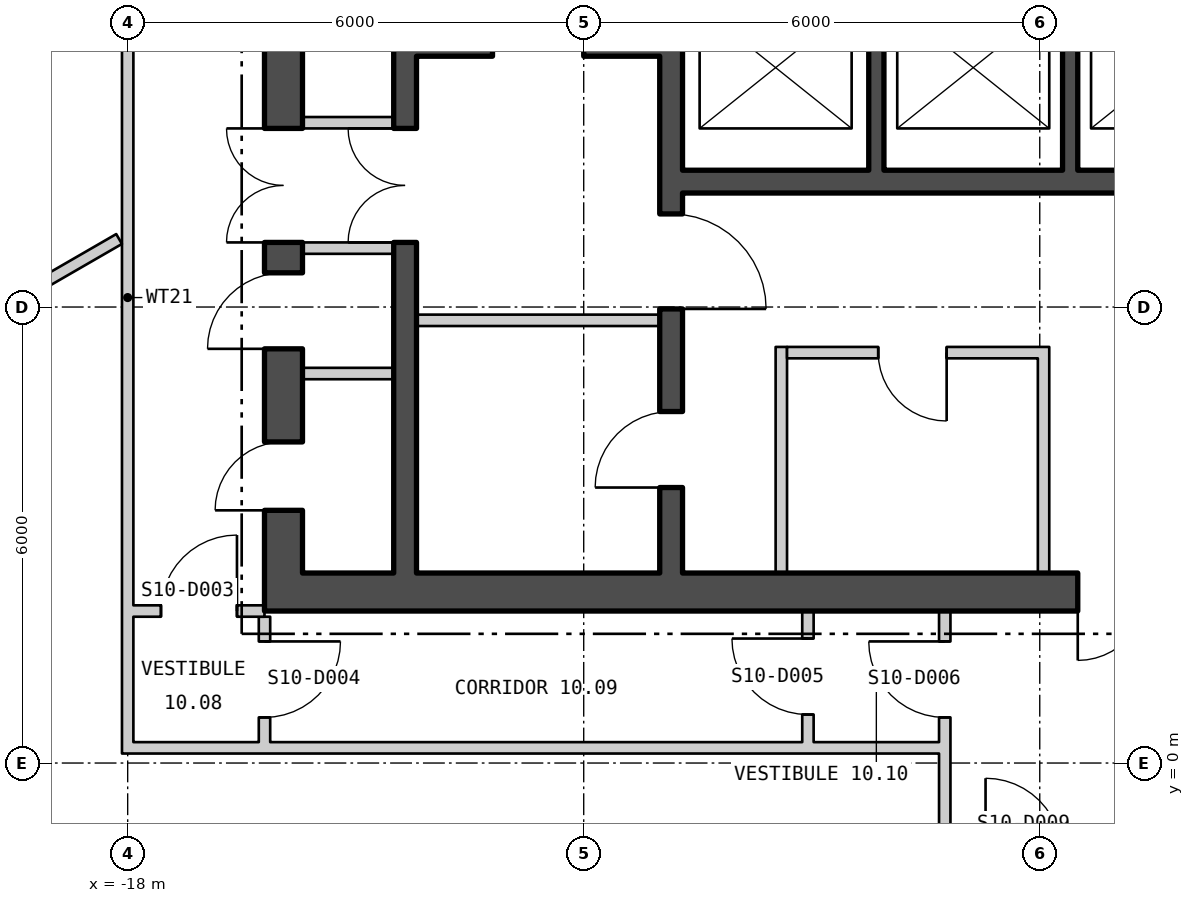
"""IFC4 building model, lengths in metres.
Left out: names, types, materials, properties, quantities, classifications, styles, units other than length and angle.
Written with IfcOpenShell. Run it as: python <this file> out.ifc"""

import sys

from ifc_helpers import new_model, si_unit, direction, frame, frame_2d, origin, place, context, subcontext, project, spatial, polyline, rectangle, outline, extrude, element, fill, save


model = new_model("IFC4")
c1 = context("Model", 3, precision=1e-05, world=origin(), true_north=direction((0.0, 1.0)))
c2 = subcontext(c1, "Body", "Model", "MODEL_VIEW")
j1 = project(units=[si_unit("LENGTHUNIT", "METRE"), si_unit("PLANEANGLEUNIT", "RADIAN")], contexts=[c1])
p1 = place(None, origin())
s1 = spatial("IfcSite", under=j1, at=p1, CompositionType="ELEMENT")
p2 = place(p1, origin())
s2 = spatial("IfcBuilding", under=s1, at=p2, CompositionType="ELEMENT")
p3 = place(p2, frame((0.0, 0.0, 139.8)))
s3 = spatial("IfcBuildingStorey", under=s2, at=p3, CompositionType="ELEMENT", Elevation=139.8)
p4 = place(p3, frame((-27.235, 12.423, -0.18), z_axis=(0.0, 0.0, 1.0), x_axis=(0.500000335318, -0.866025210188, 0.0)))
e1 = element("IfcWall", 1, at=p4, inside=s3, PredefinedType="SOLIDWALL", context=c2, shape_type="SweptSolid", body=[
    extrude(outline(polyline([(-0.13, -0.225), (45.88, -0.225), (45.62, 0.225), (0.13, 0.225), (-0.13, -0.225)])), origin(), (0.0, 0.0, 1.0), 3.68),
])
p5 = place(p4, frame((1.425, 0.0, 1.08)))
e2 = element("IfcOpeningElement", 2, at=p5, cuts=e1, PredefinedType="OPENING", context=c2, shape_type="SweptSolid", body=[
    extrude(rectangle(XDim=2.4, YDim=2.0, at=frame_2d((1.2, 1.0))), frame((0.0, 0.235, 0.0), z_axis=(0.0, -1.0, 0.0), x_axis=(1.0, 0.0, 0.0)), (0.0, 0.0, 1.0), 0.47),
])
p6 = place(p4, frame((5.895, 0.0, 1.08)))
e3 = element("IfcOpeningElement", 3, at=p6, cuts=e1, PredefinedType="OPENING", context=c2, shape_type="SweptSolid", body=[
    extrude(rectangle(XDim=2.4, YDim=2.0, at=frame_2d((1.2, 1.0))), frame((0.0, 0.235, 0.0), z_axis=(0.0, -1.0, 0.0), x_axis=(1.0, 0.0, 0.0)), (0.0, 0.0, 1.0), 0.47),
])
p7 = place(p4, frame((10.403, 0.0, 1.08)))
e4 = element("IfcOpeningElement", 4, at=p7, cuts=e1, PredefinedType="OPENING", context=c2, shape_type="SweptSolid", body=[
    extrude(rectangle(XDim=2.4, YDim=2.0, at=frame_2d((1.2, 1.0))), frame((0.0, 0.235, 0.0), z_axis=(0.0, -1.0, 0.0), x_axis=(1.0, 0.0, 0.0)), (0.0, 0.0, 1.0), 0.47),
])
p8 = place(p4, frame((14.912, 0.0, 1.08)))
e5 = element("IfcOpeningElement", 5, at=p8, cuts=e1, PredefinedType="OPENING", context=c2, shape_type="SweptSolid", body=[
    extrude(rectangle(XDim=2.4, YDim=2.0, at=frame_2d((1.2, 1.0))), frame((0.0, 0.235, 0.0), z_axis=(0.0, -1.0, 0.0), x_axis=(1.0, 0.0, 0.0)), (0.0, 0.0, 1.0), 0.47),
])
p9 = place(p4, frame((19.421, 0.0, 1.08)))
e6 = element("IfcOpeningElement", 6, at=p9, cuts=e1, PredefinedType="OPENING", context=c2, shape_type="SweptSolid", body=[
    extrude(rectangle(XDim=2.4, YDim=2.0, at=frame_2d((1.2, 1.0))), frame((0.0, 0.235, 0.0), z_axis=(0.0, -1.0, 0.0), x_axis=(1.0, 0.0, 0.0)), (0.0, 0.0, 1.0), 0.47),
])
p10 = place(p4, frame((23.929, 0.0, 1.08)))
e7 = element("IfcOpeningElement", 7, at=p10, cuts=e1, PredefinedType="OPENING", context=c2, shape_type="SweptSolid", body=[
    extrude(rectangle(XDim=2.4, YDim=2.0, at=frame_2d((1.2, 1.0))), frame((0.0, 0.235, 0.0), z_axis=(0.0, -1.0, 0.0), x_axis=(1.0, 0.0, 0.0)), (0.0, 0.0, 1.0), 0.47),
])
p11 = place(p4, frame((28.438, 0.0, 1.08)))
e8 = element("IfcOpeningElement", 8, at=p11, cuts=e1, PredefinedType="OPENING", context=c2, shape_type="SweptSolid", body=[
    extrude(rectangle(XDim=2.4, YDim=2.0, at=frame_2d((1.2, 1.0))), frame((0.0, 0.235, 0.0), z_axis=(0.0, -1.0, 0.0), x_axis=(1.0, 0.0, 0.0)), (0.0, 0.0, 1.0), 0.47),
])
p12 = place(p4, frame((32.947, 0.0, 1.08)))
e9 = element("IfcOpeningElement", 9, at=p12, cuts=e1, PredefinedType="OPENING", context=c2, shape_type="SweptSolid", body=[
    extrude(rectangle(XDim=2.4, YDim=2.0, at=frame_2d((1.2, 1.0))), frame((0.0, 0.235, 0.0), z_axis=(0.0, -1.0, 0.0), x_axis=(1.0, 0.0, 0.0)), (0.0, 0.0, 1.0), 0.47),
])
p13 = place(p4, frame((37.455, 0.0, 1.08)))
e10 = element("IfcOpeningElement", 10, at=p13, cuts=e1, PredefinedType="OPENING", context=c2, shape_type="SweptSolid", body=[
    extrude(rectangle(XDim=2.4, YDim=2.0, at=frame_2d((1.2, 1.0))), frame((0.0, 0.235, 0.0), z_axis=(0.0, -1.0, 0.0), x_axis=(1.0, 0.0, 0.0)), (0.0, 0.0, 1.0), 0.47),
])
p14 = place(p4, frame((41.925, 0.0, 1.08)))
e11 = element("IfcOpeningElement", 11, at=p14, cuts=e1, PredefinedType="OPENING", context=c2, shape_type="SweptSolid", body=[
    extrude(rectangle(XDim=2.4, YDim=2.0, at=frame_2d((1.2, 1.0))), frame((0.0, 0.235, 0.0), z_axis=(0.0, -1.0, 0.0), x_axis=(1.0, 0.0, 0.0)), (0.0, 0.0, 1.0), 0.47),
])
p15 = place(p3, frame((-16.2, 2.25, 0.0), z_axis=(0.0, 0.0, 1.0), x_axis=(1.0, 0.0, 0.0)))
e12 = element("IfcWall", 12, at=p15, inside=s3, PredefinedType="SHEAR", context=c2, shape_type="SweptSolid", body=[
    extrude(rectangle(XDim=32.4, YDim=0.5, at=frame_2d((16.2, 0.0))), origin(), (0.0, 0.0, 1.0), 3.7),
])
p16 = place(p15, frame((10.7, 0.0, 0.0)))
e13 = element("IfcOpeningElement", 13, at=p16, cuts=e12, PredefinedType="OPENING", context=c2, shape_type="SweptSolid", body=[
    extrude(rectangle(XDim=1.8, YDim=2.4, at=frame_2d((0.9, 1.2))), frame((0.0, 0.26, 0.0), z_axis=(0.0, -1.0, 0.0), x_axis=(1.0, 0.0, 0.0)), (0.0, 0.0, 1.0), 0.52),
])
p17 = place(p15, frame((20.7, 0.0, 0.0)))
e14 = element("IfcOpeningElement", 14, at=p17, cuts=e12, PredefinedType="OPENING", context=c2, shape_type="SweptSolid", body=[
    extrude(rectangle(XDim=1.8, YDim=2.4, at=frame_2d((0.9, 1.2))), frame((0.0, 0.26, 0.0), z_axis=(0.0, -1.0, 0.0), x_axis=(1.0, 0.0, 0.0)), (0.0, 0.0, 1.0), 0.52),
])
p18 = place(p3, frame((-15.95, 2.5, 0.0), z_axis=(0.0, 0.0, 1.0), x_axis=(0.0, 1.0, 0.0)))
e15 = element("IfcWall", 15, at=p18, inside=s3, PredefinedType="SHEAR", context=c2, shape_type="SweptSolid", body=[
    extrude(rectangle(XDim=15.0, YDim=0.5, at=frame_2d((7.5, 0.0))), origin(), (0.0, 0.0, 1.0), 3.7),
])
p19 = place(p18, frame((4.35, 0.0, 0.0)))
e16 = element("IfcOpeningElement", 16, at=p19, cuts=e15, PredefinedType="OPENING", context=c2, shape_type="SweptSolid", body=[
    extrude(rectangle(XDim=1.5, YDim=2.1, at=frame_2d((0.75, 1.05))), frame((0.0, 0.26, 0.0), z_axis=(0.0, -1.0, 0.0), x_axis=(1.0, 0.0, 0.0)), (0.0, 0.0, 1.0), 0.52),
])
p20 = place(p18, frame((0.825, 0.0, 0.0)))
e17 = element("IfcOpeningElement", 17, at=p20, cuts=e15, PredefinedType="OPENING", context=c2, shape_type="SweptSolid", body=[
    extrude(rectangle(XDim=0.9, YDim=2.1, at=frame_2d((0.45, 1.05))), frame((0.0, 0.26, 0.0), z_axis=(0.0, -1.0, 0.0), x_axis=(1.0, 0.0, 0.0)), (0.0, 0.0, 1.0), 0.52),
])
p21 = place(p18, frame((2.95, 0.0, 0.0)))
e18 = element("IfcOpeningElement", 18, at=p21, cuts=e15, PredefinedType="OPENING", context=c2, shape_type="SweptSolid", body=[
    extrude(rectangle(XDim=1.0, YDim=2.1, at=frame_2d((0.5, 1.05))), frame((0.0, 0.26, 0.0), z_axis=(0.0, -1.0, 0.0), x_axis=(1.0, 0.0, 0.0)), (0.0, 0.0, 1.0), 0.52),
])
p22 = place(p18, frame((8.882, 0.0, 0.0)))
e19 = element("IfcOpeningElement", 19, at=p22, cuts=e15, PredefinedType="OPENING", context=c2, shape_type="SweptSolid", body=[
    extrude(rectangle(XDim=0.9, YDim=2.1, at=frame_2d((0.45, 1.05))), frame((0.0, 0.26, 0.0), z_axis=(0.0, -1.0, 0.0), x_axis=(1.0, 0.0, 0.0)), (0.0, 0.0, 1.0), 0.52),
])
p23 = place(p18, frame((13.457, 0.0, 0.0)))
e20 = element("IfcOpeningElement", 20, at=p23, cuts=e15, PredefinedType="OPENING", context=c2, shape_type="SweptSolid", body=[
    extrude(rectangle(XDim=0.9, YDim=2.1, at=frame_2d((0.45, 1.05))), frame((0.0, 0.26, 0.0), z_axis=(0.0, -1.0, 0.0), x_axis=(1.0, 0.0, 0.0)), (0.0, 0.0, 1.0), 0.52),
])
p24 = place(p3, frame((-10.85, 2.5, 0.0), z_axis=(0.0, 0.0, 1.0), x_axis=(0.0, 1.0, 0.0)))
e21 = element("IfcWall", 21, at=p24, inside=s3, PredefinedType="SHEAR", context=c2, shape_type="SweptSolid", body=[
    extrude(rectangle(XDim=15.0, YDim=0.3, at=frame_2d((7.5, 0.0))), origin(), (0.0, 0.0, 1.0), 3.7),
])
p25 = place(p24, frame((3.475, 0.0, 0.0)))
e22 = element("IfcOpeningElement", 22, at=p25, cuts=e21, PredefinedType="OPENING", context=c2, shape_type="SweptSolid", body=[
    extrude(rectangle(XDim=1.25, YDim=2.1, at=frame_2d((0.625, 1.05))), frame((0.0, 0.16, 0.0), z_axis=(0.0, -1.0, 0.0), x_axis=(1.0, 0.0, 0.0)), (0.0, 0.0, 1.0), 0.32),
])
p26 = place(p24, frame((1.125, 0.0, 0.0)))
e23 = element("IfcOpeningElement", 23, at=p26, cuts=e21, PredefinedType="OPENING", context=c2, shape_type="SweptSolid", body=[
    extrude(rectangle(XDim=1.0, YDim=2.1, at=frame_2d((0.5, 1.05))), frame((0.0, 0.16, 0.0), z_axis=(0.0, -1.0, 0.0), x_axis=(1.0, 0.0, 0.0)), (0.0, 0.0, 1.0), 0.32),
])
p27 = place(p3, frame((-14.35, 2.5, 0.0), z_axis=(0.0, 0.0, 1.0), x_axis=(0.0, 1.0, 0.0)))
e24 = element("IfcWall", 24, at=p27, inside=s3, PredefinedType="SHEAR", context=c2, shape_type="SweptSolid", body=[
    extrude(rectangle(XDim=15.0, YDim=0.3, at=frame_2d((7.5, 0.0))), origin(), (0.0, 0.0, 1.0), 3.7),
])
p28 = place(p27, frame((4.35, 0.0, 0.0)))
e25 = element("IfcOpeningElement", 25, at=p28, cuts=e24, PredefinedType="OPENING", context=c2, shape_type="SweptSolid", body=[
    extrude(rectangle(XDim=1.5, YDim=2.1, at=frame_2d((0.75, 1.05))), frame((0.0, 0.16, 0.0), z_axis=(0.0, -1.0, 0.0), x_axis=(1.0, 0.0, 0.0)), (0.0, 0.0, 1.0), 0.32),
])
p29 = place(p3, frame((-14.2, 9.45, 0.0), z_axis=(0.0, 0.0, 1.0), x_axis=(1.0, 0.0, 0.0)))
e26 = element("IfcWall", 26, at=p29, inside=s3, PredefinedType="SHEAR", context=c2, shape_type="SweptSolid", body=[
    extrude(rectangle(XDim=3.2, YDim=0.3, at=frame_2d((1.6, 0.0))), origin(), (0.0, 0.0, 1.0), 3.7),
])
p30 = place(p29, frame((1.0, 0.0, 0.0)))
e27 = element("IfcOpeningElement", 27, at=p30, cuts=e26, PredefinedType="OPENING", context=c2, shape_type="SweptSolid", body=[
    extrude(rectangle(XDim=1.2, YDim=2.1, at=frame_2d((0.6, 1.05))), frame((0.0, 0.16, 0.0), z_axis=(0.0, -1.0, 0.0), x_axis=(1.0, 0.0, 0.0)), (0.0, 0.0, 1.0), 0.32),
])
p31 = place(p3, frame((-10.7, 7.65, 0.0), z_axis=(0.0, 0.0, 1.0), x_axis=(1.0, 0.0, 0.0)))
e28 = element("IfcWall", 28, at=p31, inside=s3, PredefinedType="SHEAR", context=c2, shape_type="SweptSolid", body=[
    extrude(rectangle(XDim=10.3, YDim=0.3, at=frame_2d((5.15, 0.0))), origin(), (0.0, 0.0, 1.0), 3.7),
])
for number, where, z_axis, x_axis in (
    (29, (-8.15, 7.8, 0.0), (0.0, 0.0, 1.0), (0.0, 1.0, 0.0)),
    (30, (-5.6, 7.8, 0.0), (0.0, 0.0, 1.0), (0.0, 1.0, 0.0)),
):
    element("IfcWall", number, at=place(p3, frame(where, z_axis=z_axis, x_axis=x_axis)), inside=s3, PredefinedType="SHEAR", context=c2, shape_type="SweptSolid", body=[
        extrude(rectangle(XDim=2.7, YDim=0.2, at=frame_2d((1.35, 0.0))), origin(), (0.0, 0.0, 1.0), 3.7),
    ])
p32 = place(p3, frame((-14.2, 5.825, 0.0), z_axis=(0.0, 0.0, 1.0), x_axis=(1.0, 0.0, 0.0)))
e31 = element("IfcWall", 31, at=p32, inside=s3, PredefinedType="PARTITIONING", context=c2, shape_type="SweptSolid", body=[
    extrude(rectangle(XDim=3.2, YDim=0.15, at=frame_2d((1.6, 0.0))), origin(), (0.0, 0.0, 1.0), 3.7),
])
for number, where, z_axis, x_axis in (
    (32, (-15.7, 6.775, 0.0), (0.0, 0.0, 1.0), (1.0, 0.0, 0.0)),
    (33, (-15.7, 8.425, 0.0), (0.0, 0.0, 1.0), (1.0, 0.0, 0.0)),
    (34, (-15.7, 5.125, 0.0), (0.0, 0.0, 1.0), (1.0, 0.0, 0.0)),
):
    element("IfcWall", number, at=place(p3, frame(where, z_axis=z_axis, x_axis=x_axis)), inside=s3, PredefinedType="PARTITIONING", context=c2, shape_type="SweptSolid", body=[
        extrude(rectangle(XDim=1.2, YDim=0.15, at=frame_2d((0.6, 0.0))), origin(), (0.0, 0.0, 1.0), 3.7),
    ])
for number, where, z_axis, x_axis in (
    (35, (-9.4, 2.5, 0.0), (0.0, 0.0, 1.0), (0.0, 1.0, 0.0)),
    (36, (-5.95, 2.5, 0.0), (0.0, 0.0, 1.0), (0.0, 1.0, 0.0)),
):
    element("IfcWall", number, at=place(p3, frame(where, z_axis=z_axis, x_axis=x_axis)), inside=s3, PredefinedType="PARTITIONING", context=c2, shape_type="SweptSolid", body=[
        extrude(rectangle(XDim=2.975, YDim=0.15, at=frame_2d((1.488, 0.0))), origin(), (0.0, 0.0, 1.0), 3.7),
    ])
p33 = place(p3, frame((-9.325, 5.4, 0.0), z_axis=(0.0, 0.0, 1.0), x_axis=(1.0, 0.0, 0.0)))
e37 = element("IfcWall", 37, at=p33, inside=s3, PredefinedType="PARTITIONING", context=c2, shape_type="SweptSolid", body=[
    extrude(rectangle(XDim=3.3, YDim=0.15, at=frame_2d((1.65, 0.0))), origin(), (0.0, 0.0, 1.0), 3.7),
])
p34 = place(p33, frame((1.2, 0.0, 0.0)))
e38 = element("IfcOpeningElement", 38, at=p34, cuts=e37, PredefinedType="OPENING", context=c2, shape_type="SweptSolid", body=[
    extrude(rectangle(XDim=0.9, YDim=2.1, at=frame_2d((0.45, 1.05))), frame((0.0, 0.085, 0.0), z_axis=(0.0, -1.0, 0.0), x_axis=(1.0, 0.0, 0.0)), (0.0, 0.0, 1.0), 0.17),
])
p35 = place(p3, frame((-21.976, 4.664, 0.0), z_axis=(0.0, 0.0, 1.0), x_axis=(0.865957845807, 0.500116995598, 0.0)))
e39 = element("IfcWall", 39, at=p35, inside=s3, PredefinedType="PARTITIONING", context=c2, shape_type="SweptSolid", body=[
    extrude(rectangle(XDim=4.461, YDim=0.15, at=frame_2d((2.231, 0.0))), origin(), (0.0, 0.0, 1.0), 3.7),
])
p36 = place(p3, frame((-18.0, 0.125, 0.0), z_axis=(0.0, 0.0, 1.0), x_axis=(0.0, 1.0, 0.0)))
e40 = element("IfcWall", 40, at=p36, inside=s3, PredefinedType="PARTITIONING", context=c2, shape_type="SweptSolid", body=[
    extrude(rectangle(XDim=11.999, YDim=0.15, at=frame_2d((6.0, 0.0))), origin(), (0.0, 0.0, 1.0), 3.7),
])
p37 = place(p3, frame((-17.925, 0.2, 0.0), z_axis=(0.0, 0.0, 1.0), x_axis=(1.0, 0.0, 0.0)))
e41 = element("IfcWall", 41, at=p37, inside=s3, PredefinedType="PARTITIONING", context=c2, shape_type="SweptSolid", body=[
    extrude(rectangle(XDim=10.6, YDim=0.15, at=frame_2d((5.3, 0.0))), origin(), (0.0, 0.0, 1.0), 3.7),
])
p38 = place(p3, frame((-17.925, 2.0, 0.0), z_axis=(0.0, 0.0, 1.0), x_axis=(1.0, 0.0, 0.0)))
e42 = element("IfcWall", 42, at=p38, inside=s3, PredefinedType="PARTITIONING", context=c2, shape_type="SweptSolid", body=[
    extrude(rectangle(XDim=1.725, YDim=0.15, at=frame_2d((0.863, 0.0))), origin(), (0.0, 0.0, 1.0), 3.11),
])
p39 = place(p38, frame((0.363, 0.0, 0.0)))
e43 = element("IfcOpeningElement", 43, at=p39, cuts=e42, PredefinedType="OPENING", context=c2, shape_type="SweptSolid", body=[
    extrude(rectangle(XDim=1.0, YDim=2.1, at=frame_2d((0.5, 1.05))), frame((0.0, 0.085, 0.0), z_axis=(0.0, -1.0, 0.0), x_axis=(1.0, 0.0, 0.0)), (0.0, 0.0, 1.0), 0.17),
])
p40 = place(p3, frame((-16.2, 0.275, 0.0), z_axis=(0.0, 0.0, 1.0), x_axis=(0.0, 1.0, 0.0)))
e44 = element("IfcWall", 44, at=p40, inside=s3, PredefinedType="PARTITIONING", context=c2, shape_type="SweptSolid", body=[
    extrude(rectangle(XDim=1.65, YDim=0.15, at=frame_2d((0.825, 0.0))), origin(), (0.0, 0.0, 1.0), 3.7),
])
p41 = place(p40, frame((0.325, 0.0, 0.0)))
e45 = element("IfcOpeningElement", 45, at=p41, cuts=e44, PredefinedType="OPENING", context=c2, shape_type="SweptSolid", body=[
    extrude(rectangle(XDim=1.0, YDim=2.1, at=frame_2d((0.5, 1.05))), frame((0.0, 0.085, 0.0), z_axis=(0.0, -1.0, 0.0), x_axis=(1.0, 0.0, 0.0)), (0.0, 0.0, 1.0), 0.17),
])
p42 = place(p3, frame((-9.05, 0.275, 0.0), z_axis=(0.0, 0.0, 1.0), x_axis=(0.0, 1.0, 0.0)))
e46 = element("IfcWall", 46, at=p42, inside=s3, PredefinedType="PARTITIONING", context=c2, shape_type="SweptSolid", body=[
    extrude(rectangle(XDim=1.725, YDim=0.15, at=frame_2d((0.863, 0.0))), origin(), (0.0, 0.0, 1.0), 3.7),
])
p43 = place(p42, frame((0.363, 0.0, 0.0)))
e47 = element("IfcOpeningElement", 47, at=p43, cuts=e46, PredefinedType="OPENING", context=c2, shape_type="SweptSolid", body=[
    extrude(rectangle(XDim=1.0, YDim=2.1, at=frame_2d((0.5, 1.05))), frame((0.0, 0.085, 0.0), z_axis=(0.0, -1.0, 0.0), x_axis=(1.0, 0.0, 0.0)), (0.0, 0.0, 1.0), 0.17),
])
p44 = place(p3, frame((-7.25, -3.46, 0.0), z_axis=(0.0, 0.0, 1.0), x_axis=(0.0, 1.0, 0.0)))
e48 = element("IfcWall", 48, at=p44, inside=s3, PredefinedType="PARTITIONING", context=c2, shape_type="SweptSolid", body=[
    extrude(rectangle(XDim=5.46, YDim=0.15, at=frame_2d((2.73, 0.0))), origin(), (0.0, 0.0, 1.0), 3.7),
])
p45 = place(p44, frame((4.06, 0.0, 0.0)))
e49 = element("IfcOpeningElement", 49, at=p45, cuts=e48, PredefinedType="OPENING", context=c2, shape_type="SweptSolid", body=[
    extrude(rectangle(XDim=1.0, YDim=2.1, at=frame_2d((0.5, 1.05))), frame((0.0, 0.085, 0.0), z_axis=(0.0, -1.0, 0.0), x_axis=(1.0, 0.0, 0.0)), (0.0, 0.0, 1.0), 0.17),
])
p46 = place(p8, origin())
e50 = element("IfcWindow", 50, at=p46, inside=s3, PartitioningType="SINGLE_PANEL", PredefinedType="WINDOW", context=c2, shape_type="SweptSolid", body=[
    extrude(rectangle(XDim=2.4, YDim=2.0, at=frame_2d((1.2, 1.0))), frame((0.0, 0.105, 0.0), z_axis=(0.0, -1.0, 0.0), x_axis=(1.0, 0.0, 0.0)), (0.0, 0.0, 1.0), 0.06),
])
fill(e5, e50)
p47 = place(p25, origin())
e51 = element("IfcDoor", 51, at=p47, inside=s3, OperationType="SINGLE_SWING_LEFT", PredefinedType="DOOR", context=c2, shape_type="SweptSolid", body=[
    extrude(rectangle(XDim=1.25, YDim=2.1, at=frame_2d((0.625, 1.05))), frame((0.0, 0.025, 0.0), z_axis=(0.0, -1.0, 0.0), x_axis=(1.0, 0.0, 0.0)), (0.0, 0.0, 1.0), 0.05),
])
fill(e22, e51)
p48 = place(p26, origin())
e52 = element("IfcDoor", 52, at=p48, inside=s3, OperationType="SINGLE_SWING_RIGHT", PredefinedType="DOOR", context=c2, shape_type="SweptSolid", body=[
    extrude(rectangle(XDim=1.0, YDim=2.1, at=frame_2d((0.5, 1.05))), frame((0.0, 0.025, 0.0), z_axis=(0.0, -1.0, 0.0), x_axis=(1.0, 0.0, 0.0)), (0.0, 0.0, 1.0), 0.05),
])
fill(e23, e52)
p49 = place(p28, origin())
e53 = element("IfcDoor", 53, at=p49, inside=s3, OperationType="DOUBLE_DOOR_SINGLE_SWING", PredefinedType="DOOR", context=c2, shape_type="SweptSolid", body=[
    extrude(rectangle(XDim=1.5, YDim=2.1, at=frame_2d((0.75, 1.05))), frame((0.0, 0.025, 0.0), z_axis=(0.0, -1.0, 0.0), x_axis=(1.0, 0.0, 0.0)), (0.0, 0.0, 1.0), 0.05),
])
fill(e25, e53)
p50 = place(p19, origin())
e54 = element("IfcDoor", 54, at=p50, inside=s3, OperationType="DOUBLE_DOOR_SINGLE_SWING", PredefinedType="DOOR", context=c2, shape_type="SweptSolid", body=[
    extrude(rectangle(XDim=1.5, YDim=2.1, at=frame_2d((0.75, 1.05))), frame((0.0, 0.025, 0.0), z_axis=(0.0, -1.0, 0.0), x_axis=(1.0, 0.0, 0.0)), (0.0, 0.0, 1.0), 0.05),
])
fill(e16, e54)
p51 = place(p20, origin())
e55 = element("IfcDoor", 55, at=p51, inside=s3, OperationType="SINGLE_SWING_RIGHT", PredefinedType="DOOR", context=c2, shape_type="SweptSolid", body=[
    extrude(rectangle(XDim=0.9, YDim=2.1, at=frame_2d((0.45, 1.05))), frame((0.0, 0.025, 0.0), z_axis=(0.0, -1.0, 0.0), x_axis=(1.0, 0.0, 0.0)), (0.0, 0.0, 1.0), 0.05),
])
fill(e17, e55)
p52 = place(p21, origin())
e56 = element("IfcDoor", 56, at=p52, inside=s3, OperationType="SINGLE_SWING_RIGHT", PredefinedType="DOOR", context=c2, shape_type="SweptSolid", body=[
    extrude(rectangle(XDim=1.0, YDim=2.1, at=frame_2d((0.5, 1.05))), frame((0.0, 0.025, 0.0), z_axis=(0.0, -1.0, 0.0), x_axis=(1.0, 0.0, 0.0)), (0.0, 0.0, 1.0), 0.05),
])
fill(e18, e56)
p53 = place(p34, origin())
e57 = element("IfcDoor", 57, at=p53, inside=s3, OperationType="SINGLE_SWING_RIGHT", PredefinedType="DOOR", context=c2, shape_type="SweptSolid", body=[
    extrude(rectangle(XDim=0.9, YDim=2.1, at=frame_2d((0.45, 1.05))), frame((0.0, 0.025, 0.0), z_axis=(0.0, -1.0, 0.0), x_axis=(1.0, 0.0, 0.0)), (0.0, 0.0, 1.0), 0.05),
])
fill(e38, e57)
p54 = place(p16, origin())
e58 = element("IfcDoor", 58, at=p54, inside=s3, OperationType="DOUBLE_DOOR_SINGLE_SWING", PredefinedType="DOOR", context=c2, shape_type="SweptSolid", body=[
    extrude(rectangle(XDim=1.8, YDim=2.4, at=frame_2d((0.9, 1.2))), frame((0.0, 0.025, 0.0), z_axis=(0.0, -1.0, 0.0), x_axis=(1.0, 0.0, 0.0)), (0.0, 0.0, 1.0), 0.05),
])
fill(e13, e58)
p55 = place(p39, origin())
e59 = element("IfcDoor", 59, at=p55, inside=s3, OperationType="SINGLE_SWING_LEFT", PredefinedType="DOOR", context=c2, shape_type="SweptSolid", body=[
    extrude(rectangle(XDim=1.0, YDim=2.1, at=frame_2d((0.5, 1.05))), frame((0.0, 0.025, 0.0), z_axis=(0.0, -1.0, 0.0), x_axis=(1.0, 0.0, 0.0)), (0.0, 0.0, 1.0), 0.05),
])
fill(e43, e59)
p56 = place(p41, origin())
e60 = element("IfcDoor", 60, at=p56, inside=s3, OperationType="SINGLE_SWING_RIGHT", PredefinedType="DOOR", context=c2, shape_type="SweptSolid", body=[
    extrude(rectangle(XDim=1.0, YDim=2.1, at=frame_2d((0.5, 1.05))), frame((0.0, 0.025, 0.0), z_axis=(0.0, -1.0, 0.0), x_axis=(1.0, 0.0, 0.0)), (0.0, 0.0, 1.0), 0.05),
])
fill(e45, e60)
p57 = place(p43, origin())
e61 = element("IfcDoor", 61, at=p57, inside=s3, OperationType="SINGLE_SWING_LEFT", PredefinedType="DOOR", context=c2, shape_type="SweptSolid", body=[
    extrude(rectangle(XDim=1.0, YDim=2.1, at=frame_2d((0.5, 1.05))), frame((0.0, 0.025, 0.0), z_axis=(0.0, -1.0, 0.0), x_axis=(1.0, 0.0, 0.0)), (0.0, 0.0, 1.0), 0.05),
])
fill(e47, e61)
p58 = place(p45, origin())
e62 = element("IfcDoor", 62, at=p58, inside=s3, OperationType="SINGLE_SWING_LEFT", PredefinedType="DOOR", context=c2, shape_type="SweptSolid", body=[
    extrude(rectangle(XDim=1.0, YDim=2.1, at=frame_2d((0.5, 1.05))), frame((0.0, 0.025, 0.0), z_axis=(0.0, -1.0, 0.0), x_axis=(1.0, 0.0, 0.0)), (0.0, 0.0, 1.0), 0.05),
])
fill(e49, e62)
save(model, sys.argv[1])
